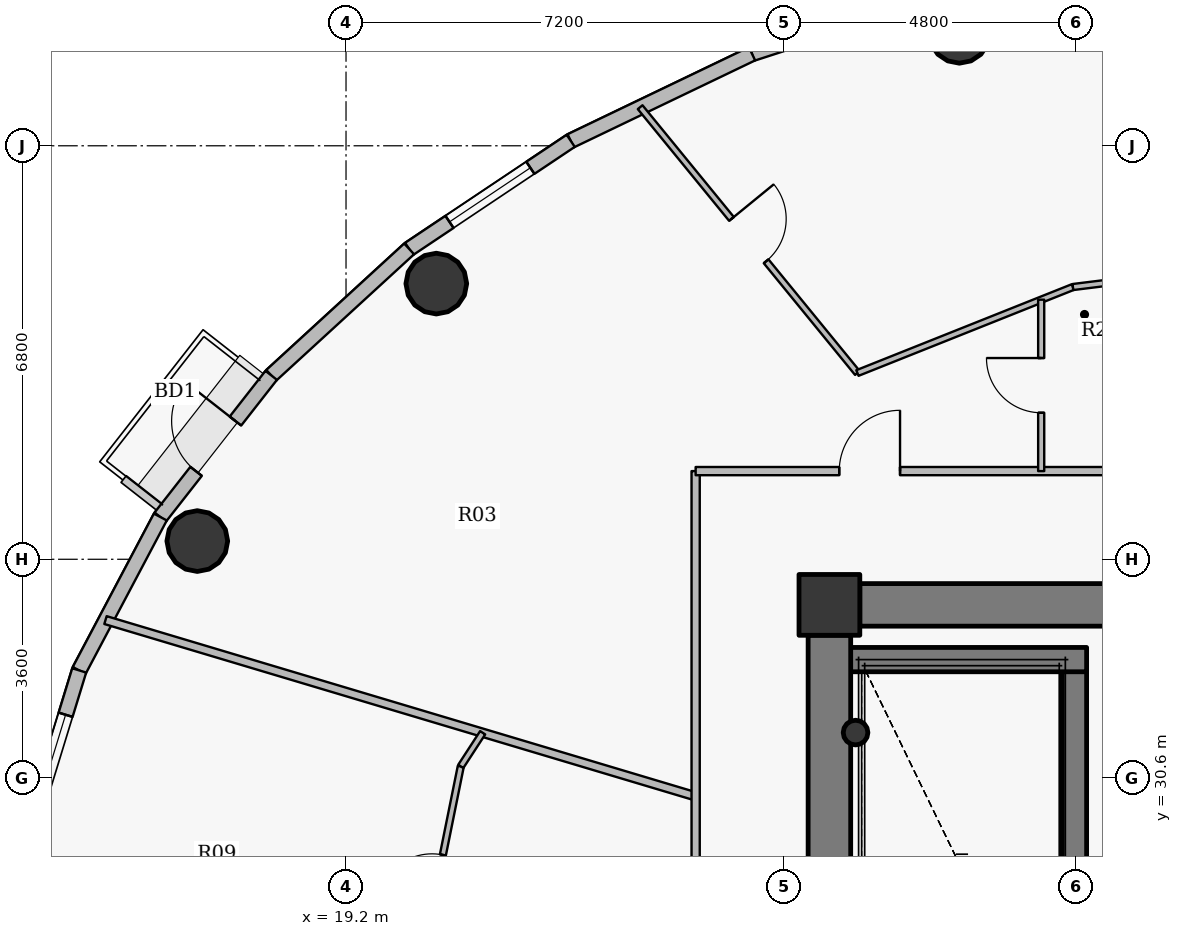
"""IFC4 building model, lengths in metres.
Left out: names, types, materials, properties, quantities, classifications, styles, units other than length and angle.
Written with IfcOpenShell. Run it as: python <this file> out.ifc"""

import sys

from ifc_helpers import new_model, si_unit, direction, frame, frame_2d, origin, origin_2d, place, context, subcontext, project, spatial, rectangle, hollow_circle, extrude, source, transform, mapped, element, fill, save


model = new_model("IFC4")
c1 = context("Model", 3, precision=1e-05, world=origin(), true_north=direction((0.0, 1.0)))
c2 = subcontext(c1, "Body", "Model", "MODEL_VIEW")
j1 = project(units=[si_unit("LENGTHUNIT", "METRE"), si_unit("PLANEANGLEUNIT", "RADIAN")], contexts=[c1])
p1 = place(None, origin())
s1 = spatial("IfcSite", under=j1, at=p1, CompositionType="ELEMENT")
p2 = place(p1, origin())
s2 = spatial("IfcBuilding", under=s1, at=p2, CompositionType="ELEMENT")
p3 = place(p2, frame((0.0, 0.0, 276.75)))
s3 = spatial("IfcBuildingStorey", under=s2, at=p3, CompositionType="ELEMENT", Elevation=276.75)
p4 = place(p3, frame((27.15, 33.45, 0.0), z_axis=(0.0, 0.0, 1.0), x_axis=(1.0, 0.0, 0.0)))
e1 = element("IfcColumn", 1, at=p4, inside=s3, PredefinedType="COLUMN", context=c2, shape_type="SweptSolid", body=[
    extrude(rectangle(XDim=1.0, YDim=1.0, at=origin_2d()), origin(), (0.0, 0.0, 1.0), 3.75),
])
p5 = place(p3, frame((31.18, 27.8, 0.0), z_axis=(0.0, 0.0, 1.0), x_axis=(0.0, 1.0, 0.0)))
e2 = element("IfcWall", 2, at=p5, inside=s3, PredefinedType="SHEAR", context=c2, shape_type="SweptSolid", body=[
    extrude(rectangle(XDim=4.75, YDim=0.4, at=frame_2d((2.375, 0.0))), origin(), (0.0, 0.0, 1.0), 3.75),
])
p6 = place(p3, frame((27.25, 32.55, 0.0), z_axis=(0.0, 0.0, 1.0), x_axis=(1.0, 0.0, 0.0)))
e3 = element("IfcWall", 3, at=p6, inside=s3, PredefinedType="SHEAR", context=c2, shape_type="SweptSolid", body=[
    extrude(rectangle(XDim=4.13, YDim=0.4, at=frame_2d((2.065, 0.0))), origin(), (0.0, 0.0, 1.0), 3.75),
])
p7 = place(p3, frame((27.58, 31.35, 0.0), z_axis=(0.0, 0.0, 1.0), x_axis=(1.0, 0.0, 0.0)))
e4 = element("IfcColumn", 4, at=p7, inside=s3, PredefinedType="COLUMN", context=c2, shape_type="SweptSolid", body=[
    extrude(hollow_circle(Radius=0.203, WallThickness=0.016, at=origin_2d()), origin(), (0.0, 0.0, 1.0), 3.75),
])
p8 = place(p3, frame((27.65, 33.45, 0.0), z_axis=(0.0, 0.0, 1.0), x_axis=(1.0, 0.0, 0.0)))
e5 = element("IfcWall", 5, at=p8, inside=s3, PredefinedType="SHEAR", context=c2, shape_type="SweptSolid", body=[
    extrude(rectangle(XDim=16.7, YDim=0.7, at=frame_2d((8.35, 0.0))), origin(), (0.0, 0.0, 1.0), 3.05),
])
p9 = place(p8, frame((12.775, 0.0, 0.0)))
e6 = element("IfcOpeningElement", 6, at=p9, cuts=e5, PredefinedType="OPENING", context=c2, shape_type="SweptSolid", body=[
    extrude(rectangle(XDim=1.15, YDim=2.15, at=origin_2d()), frame((0.575, 0.36, 1.075), z_axis=(0.0, -1.0, 0.0), x_axis=(1.0, 0.0, 0.0)), (0.0, 0.0, 1.0), 0.72),
])
p10 = place(p3, frame((27.15, 21.05, 0.0), z_axis=(0.0, 0.0, 1.0), x_axis=(0.0, 1.0, 0.0)))
e7 = element("IfcWall", 7, at=p10, inside=s3, PredefinedType="SHEAR", context=c2, shape_type="SweptSolid", body=[
    extrude(rectangle(XDim=11.9, YDim=0.7, at=frame_2d((5.95, 0.0))), origin(), (0.0, 0.0, 1.0), 3.05),
])
for number, where, z_axis, x_axis in (
    (8, (29.288, 42.858, 0.0), (0.0, 0.0, 1.0), (1.0, 0.0, 0.0)),
    (9, (20.685, 38.733, 0.0), (0.0, 0.0, 1.0), (1.0, 0.0, 0.0)),
    (10, (16.754, 34.5, 0.0), (0.0, 0.0, 1.0), (1.0, 0.0, 0.0)),
):
    element("IfcColumn", number, at=place(p3, frame(where, z_axis=z_axis, x_axis=x_axis)), inside=s3, PredefinedType="COLUMN", context=c2, shape_type="SweptSolid", body=[
        extrude(hollow_circle(Radius=0.5, WallThickness=0.032, at=origin_2d()), origin(), (0.0, 0.0, 1.0), 3.75),
    ])
p11 = place(p3, frame((25.877, 42.512, 0.0), z_axis=(0.0, 0.0, 1.0), x_axis=(0.95123136723, 0.308478339592, 0.0)))
e11 = element("IfcWall", 11, at=p11, inside=s3, PredefinedType="SOLIDWALL", context=c2, shape_type="SweptSolid", body=[
    extrude(rectangle(XDim=3.398, YDim=0.24, at=frame_2d((1.699, 0.0))), origin(), (0.0, 0.0, 1.0), 3.5),
])
p12 = place(p11, frame((0.899, 0.0, 0.9)))
e12 = element("IfcOpeningElement", 12, at=p12, cuts=e11, PredefinedType="OPENING", context=c2, shape_type="SweptSolid", body=[
    extrude(rectangle(XDim=1.6, YDim=1.75, at=origin_2d()), frame((0.8, 0.13, 0.875), z_axis=(0.0, -1.0, 0.0), x_axis=(1.0, 0.0, 0.0)), (0.0, 0.0, 1.0), 0.26),
])
p13 = place(p3, frame((22.896, 41.082, 0.0), z_axis=(0.0, 0.0, 1.0), x_axis=(0.901573741254, 0.43262546051, 0.0)))
e13 = element("IfcWall", 13, at=p13, inside=s3, PredefinedType="SOLIDWALL", context=c2, shape_type="SweptSolid", body=[
    extrude(rectangle(XDim=3.307, YDim=0.24, at=frame_2d((1.653, 0.0))), origin(), (0.0, 0.0, 1.0), 3.5),
])
p14 = place(p3, frame((20.238, 39.304, 0.0), z_axis=(0.0, 0.0, 1.0), x_axis=(0.831250592635, 0.55589787933, 0.0)))
e14 = element("IfcWall", 14, at=p14, inside=s3, PredefinedType="SOLIDWALL", context=c2, shape_type="SweptSolid", body=[
    extrude(rectangle(XDim=3.197, YDim=0.24, at=frame_2d((1.599, 0.0))), origin(), (0.0, 0.0, 1.0), 3.5),
])
p15 = place(p14, frame((0.799, 0.0, 0.9)))
e15 = element("IfcOpeningElement", 15, at=p15, cuts=e14, PredefinedType="OPENING", context=c2, shape_type="SweptSolid", body=[
    extrude(rectangle(XDim=1.6, YDim=1.75, at=origin_2d()), frame((0.8, 0.13, 0.875), z_axis=(0.0, -1.0, 0.0), x_axis=(1.0, 0.0, 0.0)), (0.0, 0.0, 1.0), 0.26),
])
p16 = place(p3, frame((17.97, 37.225, 0.0), z_axis=(0.0, 0.0, 1.0), x_axis=(0.737068506972, 0.675818034703, 0.0)))
e16 = element("IfcWall", 16, at=p16, inside=s3, PredefinedType="SOLIDWALL", context=c2, shape_type="SweptSolid", body=[
    extrude(rectangle(XDim=3.077, YDim=0.24, at=frame_2d((1.539, 0.0))), origin(), (0.0, 0.0, 1.0), 3.5),
])
p17 = place(p3, frame((16.146, 34.895, 0.0), z_axis=(0.0, 0.0, 1.0), x_axis=(0.616337186556, 0.787482363275, 0.0)))
e17 = element("IfcWall", 17, at=p17, inside=s3, PredefinedType="SOLIDWALL", context=c2, shape_type="SweptSolid", body=[
    extrude(rectangle(XDim=2.958, YDim=0.24, at=frame_2d((1.479, 0.0))), origin(), (0.0, 0.0, 1.0), 3.5),
])
p18 = place(p17, frame((0.954, 0.0, 0.0)))
e18 = element("IfcOpeningElement", 18, at=p18, cuts=e17, PredefinedType="OPENING", context=c2, shape_type="SweptSolid", body=[
    extrude(rectangle(XDim=1.05, YDim=2.15, at=origin_2d()), frame((0.525, 0.13, 1.075), z_axis=(0.0, -1.0, 0.0), x_axis=(1.0, 0.0, 0.0)), (0.0, 0.0, 1.0), 0.26),
])
p19 = place(p3, frame((14.812, 32.372, 0.0), z_axis=(0.0, 0.0, 1.0), x_axis=(0.467628269026, 0.883925224218, 0.0)))
e19 = element("IfcWall", 19, at=p19, inside=s3, PredefinedType="SOLIDWALL", context=c2, shape_type="SweptSolid", body=[
    extrude(rectangle(XDim=2.854, YDim=0.24, at=frame_2d((1.427, 0.0))), origin(), (0.0, 0.0, 1.0), 3.5),
])
p20 = place(p3, frame((13.998, 29.719, 0.0), z_axis=(0.0, 0.0, 1.0), x_axis=(0.2931213403, 0.956075248012, 0.0)))
e20 = element("IfcWall", 20, at=p20, inside=s3, PredefinedType="SOLIDWALL", context=c2, shape_type="SweptSolid", body=[
    extrude(rectangle(XDim=2.775, YDim=0.24, at=frame_2d((1.388, 0.0))), origin(), (0.0, 0.0, 1.0), 3.5),
])
p21 = place(p20, frame((0.763, 0.0, 0.9)))
e21 = element("IfcOpeningElement", 21, at=p21, cuts=e20, PredefinedType="OPENING", context=c2, shape_type="SweptSolid", body=[
    extrude(rectangle(XDim=1.25, YDim=1.65, at=origin_2d()), frame((0.625, 0.13, 0.825), z_axis=(0.0, -1.0, 0.0), x_axis=(1.0, 0.0, 0.0)), (0.0, 0.0, 1.0), 0.26),
])
p22 = place(p3, frame((15.244, 33.2, 0.0), z_axis=(0.0, 0.0, 1.0), x_axis=(0.958167234785, -0.286208927508, 0.0)))
e22 = element("IfcWall", 22, at=p22, inside=s3, PredefinedType="PARTITIONING", context=c2, shape_type="SweptSolid", body=[
    extrude(rectangle(XDim=10.13, YDim=0.135, at=frame_2d((5.065, 0.0))), origin(), (0.0, 0.0, 1.0), 2.985),
])
p23 = place(p3, frame((20.32, 27.0, 0.0), z_axis=(0.0, 0.0, 1.0), x_axis=(0.198226068862, 0.980156327135, 0.0)))
e23 = element("IfcWall", 23, at=p23, inside=s3, PredefinedType="PARTITIONING", context=c2, shape_type="SweptSolid", body=[
    extrude(rectangle(XDim=3.871, YDim=0.1, at=frame_2d((1.936, 0.0))), origin(), (0.0, 0.0, 1.0), 3.035),
])
p24 = place(p23, frame((1.486, 0.0, 0.0)))
e24 = element("IfcOpeningElement", 24, at=p24, cuts=e23, PredefinedType="OPENING", context=c2, shape_type="SweptSolid", body=[
    extrude(rectangle(XDim=0.9, YDim=2.1, at=origin_2d()), frame((0.45, 0.06, 1.05), z_axis=(0.0, -1.0, 0.0), x_axis=(1.0, 0.0, 0.0)), (0.0, 0.0, 1.0), 0.12),
])
p25 = place(p3, frame((21.087, 30.794, 0.0), z_axis=(0.0, 0.0, 1.0), x_axis=(0.545443507803, 0.838147588313, 0.0)))
e25 = element("IfcWall", 25, at=p25, inside=s3, PredefinedType="PARTITIONING", context=c2, shape_type="SweptSolid", body=[
    extrude(rectangle(XDim=0.66, YDim=0.1, at=frame_2d((0.33, 0.0))), origin(), (0.0, 0.0, 1.0), 3.5),
])
p26 = place(p3, frame((24.037, 41.635, 0.0), z_axis=(0.0, 0.0, 1.0), x_axis=(0.632896331295, -0.774236549017, 0.0)))
e26 = element("IfcWall", 26, at=p26, inside=s3, PredefinedType="PARTITIONING", context=c2, shape_type="SweptSolid", body=[
    extrude(rectangle(XDim=5.647, YDim=0.1, at=frame_2d((2.823, 0.0))), origin(), (0.0, 0.0, 1.0), 2.985),
])
p27 = place(p26, frame((2.373, 0.0, 0.0)))
e27 = element("IfcOpeningElement", 27, at=p27, cuts=e26, PredefinedType="OPENING", context=c2, shape_type="SweptSolid", body=[
    extrude(rectangle(XDim=0.9, YDim=2.1, at=origin_2d()), frame((0.45, 0.06, 1.05), z_axis=(0.0, -1.0, 0.0), x_axis=(1.0, 0.0, 0.0)), (0.0, 0.0, 1.0), 0.12),
])
p28 = place(p3, frame((24.95, 18.35, 0.0), z_axis=(0.0, 0.0, 1.0), x_axis=(0.0, 1.0, 0.0)))
e28 = element("IfcWall", 28, at=p28, inside=s3, PredefinedType="PARTITIONING", context=c2, shape_type="SweptSolid", body=[
    extrude(rectangle(XDim=17.3, YDim=0.135, at=frame_2d((8.65, 0.0))), origin(), (0.0, 0.0, 1.0), 3.035),
])
p29 = place(p28, frame((5.495, 0.0, 0.0)))
e29 = element("IfcOpeningElement", 29, at=p29, cuts=e28, PredefinedType="OPENING", context=c2, shape_type="SweptSolid", body=[
    extrude(rectangle(XDim=1.0, YDim=2.15, at=origin_2d()), frame((0.5, 0.078, 1.075), z_axis=(0.0, -1.0, 0.0), x_axis=(1.0, 0.0, 0.0)), (0.0, 0.0, 1.0), 0.155),
])
p30 = place(p3, frame((24.95, 35.65, 0.0), z_axis=(0.0, 0.0, 1.0), x_axis=(1.0, 0.0, 0.0)))
e30 = element("IfcWall", 30, at=p30, inside=s3, PredefinedType="PARTITIONING", context=c2, shape_type="SweptSolid", body=[
    extrude(rectangle(XDim=10.1, YDim=0.135, at=frame_2d((5.05, 0.0))), origin(), (0.0, 0.0, 1.0), 3.035),
])
p31 = place(p30, frame((2.362, 0.0, 0.0)))
e31 = element("IfcOpeningElement", 31, at=p31, cuts=e30, PredefinedType="OPENING", context=c2, shape_type="SweptSolid", body=[
    extrude(rectangle(XDim=1.0, YDim=2.15, at=origin_2d()), frame((0.5, 0.078, 1.075), z_axis=(0.0, -1.0, 0.0), x_axis=(1.0, 0.0, 0.0)), (0.0, 0.0, 1.0), 0.155),
])
p32 = place(p3, frame((27.611, 37.263, 0.0), z_axis=(0.0, 0.0, 1.0), x_axis=(0.92879851462, 0.370585103911, 0.0)))
e32 = element("IfcWall", 32, at=p32, inside=s3, PredefinedType="PARTITIONING", context=c2, shape_type="SweptSolid", body=[
    extrude(rectangle(XDim=3.815, YDim=0.1, at=frame_2d((1.908, 0.0))), origin(), (0.0, 0.0, 1.0), 3.035),
])
p33 = place(p3, frame((30.633, 35.65, 0.0), z_axis=(0.0, 0.0, 1.0), x_axis=(0.0, 1.0, 0.0)))
e33 = element("IfcWall", 33, at=p33, inside=s3, PredefinedType="PARTITIONING", context=c2, shape_type="SweptSolid", body=[
    extrude(rectangle(XDim=2.819, YDim=0.1, at=frame_2d((1.41, 0.0))), origin(), (0.0, 0.0, 1.0), 3.5),
])
p34 = place(p33, frame((0.959, 0.0, 0.0)))
e34 = element("IfcOpeningElement", 34, at=p34, cuts=e33, PredefinedType="OPENING", context=c2, shape_type="SweptSolid", body=[
    extrude(rectangle(XDim=0.9, YDim=2.1, at=origin_2d()), frame((0.45, 0.06, 1.05), z_axis=(0.0, -1.0, 0.0), x_axis=(1.0, 0.0, 0.0)), (0.0, 0.0, 1.0), 0.12),
])
p35 = place(p3, frame((31.155, 38.677, 0.0), z_axis=(0.0, 0.0, 1.0), x_axis=(0.99239360053, 0.123105408601, 0.0)))
e35 = element("IfcWall", 35, at=p35, inside=s3, PredefinedType="PARTITIONING", context=c2, shape_type="SweptSolid", body=[
    extrude(rectangle(XDim=4.883, YDim=0.1, at=frame_2d((2.441, 0.0))), origin(), (0.0, 0.0, 1.0), 3.035),
])
p36 = place(p3, frame((27.64, 33.8, 0.0), z_axis=(0.0, 0.0, 1.0), x_axis=(-1.0, 0.0, 0.0)))
e36 = element("IfcWall", 36, at=p36, inside=s3, PredefinedType="PARTITIONING", context=c2, shape_type="SweptSolid", body=[
    extrude(rectangle(XDim=0.84, YDim=0.135, at=frame_2d((0.42, 0.0))), origin(), (0.0, 0.0, 1.0), 3.035),
])
p37 = place(p3, frame((26.8, 33.492, 0.0), z_axis=(0.0, 0.0, 1.0), x_axis=(0.0, -1.0, 0.0)))
e37 = element("IfcWall", 37, at=p37, inside=s3, PredefinedType="PARTITIONING", context=c2, shape_type="SweptSolid", body=[
    extrude(rectangle(XDim=0.532, YDim=0.135, at=frame_2d((0.266, 0.0))), origin(), (0.0, 0.0, 1.0), 3.5),
])
m1 = source(origin(), c2, "Body", "SweptSolid", [
    extrude(rectangle(XDim=1.6, YDim=1.75, at=origin_2d()), frame((0.8, 0.03, 0.875), z_axis=(0.0, -1.0, 0.0), x_axis=(1.0, 0.0, 0.0)), (0.0, 0.0, 1.0), 0.06),
])
p38 = place(p15, origin())
e38 = element("IfcWindow", 38, at=p38, inside=s3, PartitioningType="DOUBLE_PANEL_VERTICAL", PredefinedType="WINDOW", context=c2, shape_type="MappedRepresentation", body=[
    mapped(m1, transform((0.0, 0.0, 0.0), x_axis=(1.0, 0.0, 0.0), y_axis=(0.0, 1.0, 0.0), z_axis=(0.0, 0.0, 1.0), scale=1.0)),
])
fill(e15, e38)
m2 = source(origin(), c2, "Body", "SweptSolid", [
    extrude(rectangle(XDim=1.05, YDim=2.15, at=origin_2d()), frame((0.525, 0.025, 1.075), z_axis=(0.0, -1.0, 0.0), x_axis=(1.0, 0.0, 0.0)), (0.0, 0.0, 1.0), 0.05),
])
p39 = place(p18, origin())
e39 = element("IfcDoor", 39, at=p39, inside=s3, OperationType="SINGLE_SWING_RIGHT", PredefinedType="DOOR", context=c2, shape_type="MappedRepresentation", body=[
    mapped(m2, transform((0.0, 0.0, 0.0), x_axis=(1.0, 0.0, 0.0), y_axis=(0.0, 1.0, 0.0), z_axis=(0.0, 0.0, 1.0), scale=1.0)),
])
fill(e18, e39)
m3 = source(origin(), c2, "Body", "SweptSolid", [
    extrude(rectangle(XDim=1.25, YDim=1.65, at=origin_2d()), frame((0.625, 0.03, 0.825), z_axis=(0.0, -1.0, 0.0), x_axis=(1.0, 0.0, 0.0)), (0.0, 0.0, 1.0), 0.06),
])
p40 = place(p21, origin())
e40 = element("IfcWindow", 40, at=p40, inside=s3, PartitioningType="SINGLE_PANEL", PredefinedType="WINDOW", context=c2, shape_type="MappedRepresentation", body=[
    mapped(m3, transform((0.0, 0.0, 0.0), x_axis=(1.0, 0.0, 0.0), y_axis=(0.0, 1.0, 0.0), z_axis=(0.0, 0.0, 1.0), scale=1.0)),
])
fill(e21, e40)
m4 = source(origin(), c2, "Body", "SweptSolid", [
    extrude(rectangle(XDim=1.0, YDim=2.15, at=origin_2d()), frame((0.5, 0.025, 1.075), z_axis=(0.0, -1.0, 0.0), x_axis=(1.0, 0.0, 0.0)), (0.0, 0.0, 1.0), 0.05),
])
p41 = place(p31, origin())
e41 = element("IfcDoor", 41, at=p41, inside=s3, OperationType="SINGLE_SWING_RIGHT", PredefinedType="DOOR", context=c2, shape_type="MappedRepresentation", body=[
    mapped(m4, transform((0.0, 0.0, 0.0), x_axis=(1.0, 0.0, 0.0), y_axis=(0.0, 1.0, 0.0), z_axis=(0.0, 0.0, 1.0), scale=1.0)),
])
fill(e31, e41)
m5 = source(origin(), c2, "Body", "SweptSolid", [
    extrude(rectangle(XDim=0.9, YDim=2.1, at=origin_2d()), frame((0.45, 0.025, 1.05), z_axis=(0.0, -1.0, 0.0), x_axis=(1.0, 0.0, 0.0)), (0.0, 0.0, 1.0), 0.05),
])
p42 = place(p27, origin())
e42 = element("IfcDoor", 42, at=p42, inside=s3, OperationType="SINGLE_SWING_LEFT", PredefinedType="DOOR", context=c2, shape_type="MappedRepresentation", body=[
    mapped(m5, transform((0.0, 0.0, 0.0), x_axis=(1.0, 0.0, 0.0), y_axis=(0.0, 1.0, 0.0), z_axis=(0.0, 0.0, 1.0), scale=1.0)),
])
fill(e27, e42)
p43 = place(p34, origin())
e43 = element("IfcDoor", 43, at=p43, inside=s3, OperationType="SINGLE_SWING_RIGHT", PredefinedType="DOOR", context=c2, shape_type="MappedRepresentation", body=[
    mapped(m5, transform((0.0, 0.0, 0.0), x_axis=(1.0, 0.0, 0.0), y_axis=(0.0, 1.0, 0.0), z_axis=(0.0, 0.0, 1.0), scale=1.0)),
])
fill(e34, e43)
p44 = place(p24, origin())
e44 = element("IfcDoor", 44, at=p44, inside=s3, OperationType="SINGLE_SWING_LEFT", PredefinedType="DOOR", context=c2, shape_type="MappedRepresentation", body=[
    mapped(m5, transform((0.0, 0.0, 0.0), x_axis=(1.0, 0.0, 0.0), y_axis=(0.0, 1.0, 0.0), z_axis=(0.0, 0.0, 1.0), scale=1.0)),
])
fill(e24, e44)
save(model, sys.argv[1])
